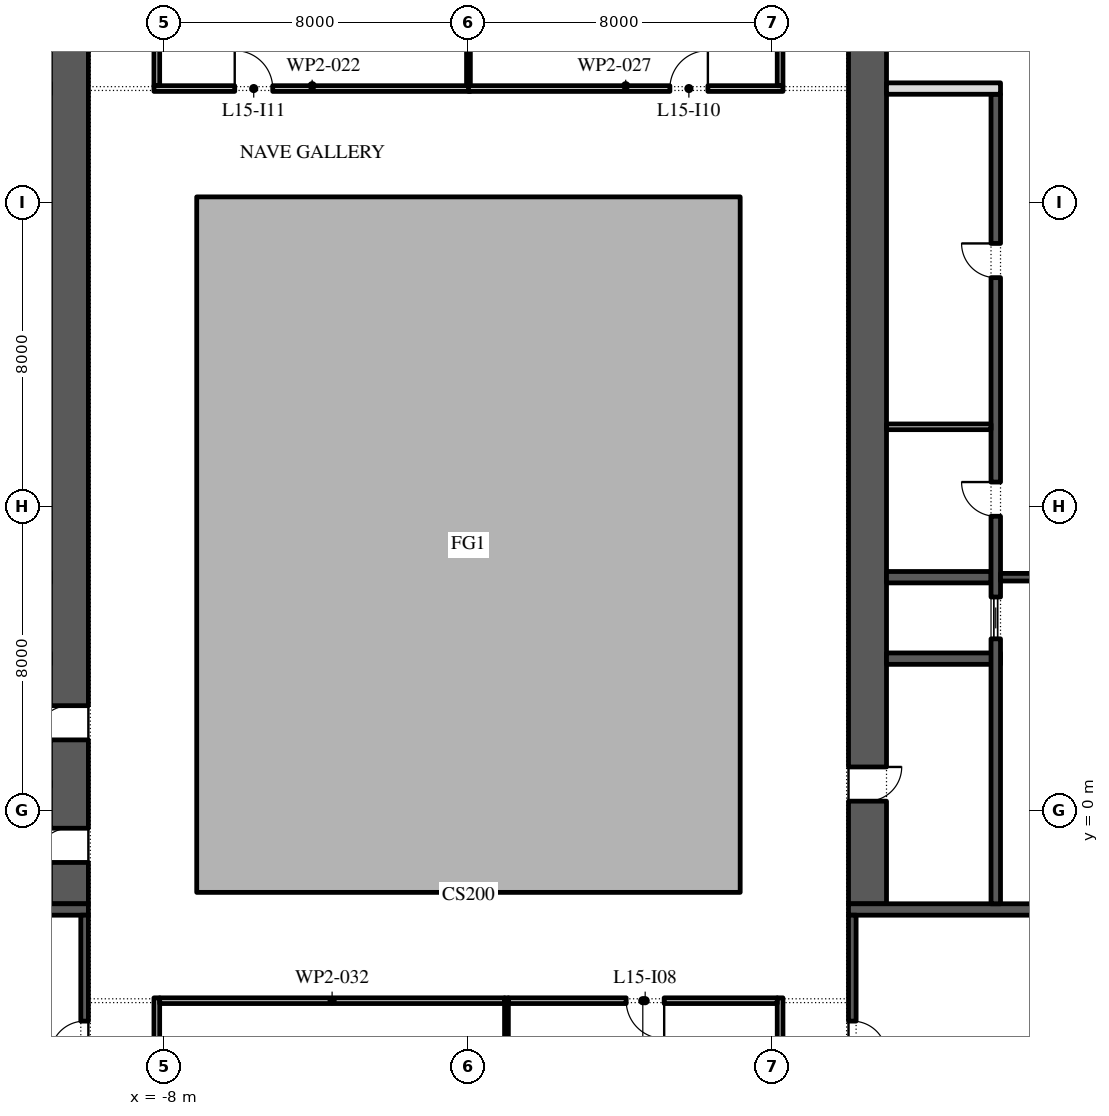
"""IFC4 building model, lengths in metres.
Left out: names, types, materials, properties, quantities, classifications, styles, units other than length and angle.
Written with IfcOpenShell. Run it as: python <this file> out.ifc"""

import sys

from ifc_helpers import new_model, si_unit, direction, frame, frame_2d, origin, place, context, subcontext, project, spatial, polyline, rectangle, outline, extrude, element, fill, save


model = new_model("IFC4")
c1 = context("Model", 3, precision=1e-05, world=origin(), true_north=direction((0.0, 1.0)))
c2 = subcontext(c1, "Body", "Model", "MODEL_VIEW")
j1 = project(units=[si_unit("LENGTHUNIT", "METRE"), si_unit("PLANEANGLEUNIT", "RADIAN")], contexts=[c1])
p1 = place(None, origin())
s1 = spatial("IfcSite", under=j1, at=p1, CompositionType="ELEMENT")
p2 = place(p1, origin())
s2 = spatial("IfcBuilding", under=s1, at=p2, CompositionType="ELEMENT")
p3 = place(p2, frame((0.0, 0.0, 73.2)))
s3 = spatial("IfcBuildingStorey", under=s2, at=p3, CompositionType="ELEMENT", Elevation=73.2)
p4 = place(p3, origin())
e1 = element("IfcWall", 1, at=p4, inside=s3, PredefinedType="STANDARD", context=c2, shape_type="SweptSolid", body=[
    extrude(outline(polyline([(-7.15, -2.15), (7.15, -2.15), (7.15, 16.15), (-7.15, 16.15), (-7.15, -2.15)]), holes=[polyline([(-7.0, -2.0), (-7.0, 16.0), (7.0, 16.0), (7.0, -2.0), (-7.0, -2.0)])]), origin(), (0.0, 0.0, 1.0), 4.0),
])
p5 = place(p3, frame((-10.5, -2.45, 0.0), z_axis=(0.0, 0.0, 1.0), x_axis=(0.0, 1.0, 0.0)))
e2 = element("IfcWall", 2, at=p5, inside=s3, PredefinedType="SHEAR", context=c2, shape_type="SweptSolid", body=[
    extrude(rectangle(XDim=27.9, YDim=1.0, at=frame_2d((13.95, 0.0))), origin(), (0.0, 0.0, 1.0), 4.0),
])
p6 = place(p5, frame((23.65, 0.0, 0.0)))
e3 = element("IfcOpeningElement", 3, at=p6, cuts=e2, PredefinedType="OPENING", context=c2, shape_type="SweptSolid", body=[
    extrude(rectangle(XDim=2.4, YDim=2.1, at=frame_2d((1.2, 1.05))), frame((0.0, 0.51, 0.0), z_axis=(0.0, -1.0, 0.0), x_axis=(1.0, 0.0, 0.0)), (0.0, 0.0, 1.0), 1.02),
])
p7 = place(p5, frame((1.087, 0.0, 0.0)))
e4 = element("IfcOpeningElement", 4, at=p7, cuts=e2, PredefinedType="OPENING", context=c2, shape_type="SweptSolid", body=[
    extrude(rectangle(XDim=0.9, YDim=2.1, at=frame_2d((0.45, 1.05))), frame((0.0, 0.51, 0.0), z_axis=(0.0, -1.0, 0.0), x_axis=(1.0, 0.0, 0.0)), (0.0, 0.0, 1.0), 1.02),
])
p8 = place(p5, frame((4.312, 0.0, 0.0)))
e5 = element("IfcOpeningElement", 5, at=p8, cuts=e2, PredefinedType="OPENING", context=c2, shape_type="SweptSolid", body=[
    extrude(rectangle(XDim=0.9, YDim=2.1, at=frame_2d((0.45, 1.05))), frame((0.0, 0.51, 0.0), z_axis=(0.0, -1.0, 0.0), x_axis=(1.0, 0.0, 0.0)), (0.0, 0.0, 1.0), 1.02),
])
p9 = place(p3, frame((-22.0, -2.6, 0.0), z_axis=(0.0, 0.0, 1.0), x_axis=(1.0, 0.0, 0.0)))
e6 = element("IfcWall", 6, at=p9, inside=s3, PredefinedType="SHEAR", context=c2, shape_type="SweptSolid", body=[
    extrude(rectangle(XDim=12.0, YDim=0.3, at=frame_2d((6.0, 0.0))), origin(), (0.0, 0.0, 1.0), 4.0),
])
p10 = place(p3, frame((-10.1, -15.8, 0.0), z_axis=(0.0, 0.0, 1.0), x_axis=(0.0, 1.0, 0.0)))
e7 = element("IfcWall", 7, at=p10, inside=s3, PredefinedType="SHEAR", context=c2, shape_type="SweptSolid", body=[
    extrude(rectangle(XDim=13.05, YDim=0.2, at=frame_2d((6.525, 0.0))), origin(), (0.0, 0.0, 1.0), 4.0),
])
p11 = place(p10, frame((2.762, 0.0, 0.0)))
e8 = element("IfcOpeningElement", 8, at=p11, cuts=e7, PredefinedType="OPENING", context=c2, shape_type="SweptSolid", body=[
    extrude(rectangle(XDim=0.9, YDim=2.1, at=frame_2d((0.45, 1.05))), frame((0.0, 0.11, 0.0), z_axis=(0.0, -1.0, 0.0), x_axis=(1.0, 0.0, 0.0)), (0.0, 0.0, 1.0), 0.22),
])
p12 = place(p10, frame((9.363, 0.0, 0.0)))
e9 = element("IfcOpeningElement", 9, at=p12, cuts=e7, PredefinedType="OPENING", context=c2, shape_type="SweptSolid", body=[
    extrude(rectangle(XDim=0.9, YDim=2.1, at=frame_2d((0.45, 1.05))), frame((0.0, 0.11, 0.0), z_axis=(0.0, -1.0, 0.0), x_axis=(1.0, 0.0, 0.0)), (0.0, 0.0, 1.0), 0.22),
])
p13 = place(p3, frame((10.5, -2.45, 0.0), z_axis=(0.0, 0.0, 1.0), x_axis=(0.0, 1.0, 0.0)))
e10 = element("IfcWall", 10, at=p13, inside=s3, PredefinedType="SHEAR", context=c2, shape_type="SweptSolid", body=[
    extrude(rectangle(XDim=27.9, YDim=1.0, at=frame_2d((13.95, 0.0))), origin(), (0.0, 0.0, 1.0), 4.0),
])
p14 = place(p13, frame((23.65, 0.0, 0.0)))
e11 = element("IfcOpeningElement", 11, at=p14, cuts=e10, PredefinedType="OPENING", context=c2, shape_type="SweptSolid", body=[
    extrude(rectangle(XDim=2.4, YDim=2.1, at=frame_2d((1.2, 1.05))), frame((0.0, 0.51, 0.0), z_axis=(0.0, -1.0, 0.0), x_axis=(1.0, 0.0, 0.0)), (0.0, 0.0, 1.0), 1.02),
])
p15 = place(p13, frame((2.7, 0.0, 0.0)))
e12 = element("IfcOpeningElement", 12, at=p15, cuts=e10, PredefinedType="OPENING", context=c2, shape_type="SweptSolid", body=[
    extrude(rectangle(XDim=0.9, YDim=2.1, at=frame_2d((0.45, 1.05))), frame((0.0, 0.51, 0.0), z_axis=(0.0, -1.0, 0.0), x_axis=(1.0, 0.0, 0.0)), (0.0, 0.0, 1.0), 1.02),
])
p16 = place(p3, frame((10.0, -2.6, 0.0), z_axis=(0.0, 0.0, 1.0), x_axis=(1.0, 0.0, 0.0)))
e13 = element("IfcWall", 13, at=p16, inside=s3, PredefinedType="SHEAR", context=c2, shape_type="SweptSolid", body=[
    extrude(rectangle(XDim=12.0, YDim=0.3, at=frame_2d((6.0, 0.0))), origin(), (0.0, 0.0, 1.0), 4.0),
])
p17 = place(p3, frame((11.0, 4.0, 0.0), z_axis=(0.0, 0.0, 1.0), x_axis=(1.0, 0.0, 0.0)))
e14 = element("IfcWall", 14, at=p17, inside=s3, PredefinedType="SHEAR", context=c2, shape_type="SweptSolid", body=[
    extrude(rectangle(XDim=3.0, YDim=0.3, at=frame_2d((1.5, 0.0))), origin(), (0.0, 0.0, 1.0), 4.0),
])
p18 = place(p3, frame((11.0, 6.143, 0.0), z_axis=(0.0, 0.0, 1.0), x_axis=(1.0, 0.0, 0.0)))
e15 = element("IfcWall", 15, at=p18, inside=s3, PredefinedType="SHEAR", context=c2, shape_type="SweptSolid", body=[
    extrude(rectangle(XDim=2.75, YDim=0.3, at=frame_2d((1.375, 0.0))), origin(), (0.0, 0.0, 1.0), 4.0),
])
p19 = place(p3, frame((13.875, -2.45, 0.0), z_axis=(0.0, 0.0, 1.0), x_axis=(0.0, 1.0, 0.0)))
e16 = element("IfcWall", 16, at=p19, inside=s3, PredefinedType="SHEAR", context=c2, shape_type="SweptSolid", body=[
    extrude(rectangle(XDim=21.3, YDim=0.25, at=frame_2d((10.65, 0.0))), origin(), (0.0, 0.0, 1.0), 4.0),
])
p20 = place(p19, frame((10.196, 0.0, 0.0)))
e17 = element("IfcOpeningElement", 17, at=p20, cuts=e16, PredefinedType="OPENING", context=c2, shape_type="SweptSolid", body=[
    extrude(rectangle(XDim=0.9, YDim=2.1, at=frame_2d((0.45, 1.05))), frame((0.0, 0.135, 0.0), z_axis=(0.0, -1.0, 0.0), x_axis=(1.0, 0.0, 0.0)), (0.0, 0.0, 1.0), 0.27),
])
p21 = place(p19, frame((16.475, 0.0, 0.0)))
e18 = element("IfcOpeningElement", 18, at=p21, cuts=e16, PredefinedType="OPENING", context=c2, shape_type="SweptSolid", body=[
    extrude(rectangle(XDim=0.9, YDim=2.1, at=frame_2d((0.45, 1.05))), frame((0.0, 0.135, 0.0), z_axis=(0.0, -1.0, 0.0), x_axis=(1.0, 0.0, 0.0)), (0.0, 0.0, 1.0), 0.27),
])
p22 = place(p19, frame((6.971, 0.0, 0.0)))
e19 = element("IfcOpeningElement", 19, at=p22, cuts=e16, PredefinedType="OPENING", context=c2, shape_type="SweptSolid", body=[
    extrude(rectangle(XDim=1.1, YDim=2.1, at=frame_2d((0.55, 1.05))), frame((0.0, 0.135, 0.0), z_axis=(0.0, -1.0, 0.0), x_axis=(1.0, 0.0, 0.0)), (0.0, 0.0, 1.0), 0.27),
])
p23 = place(p3, frame((11.0, 19.0, 0.0), z_axis=(0.0, 0.0, 1.0), x_axis=(1.0, 0.0, 0.0)))
e20 = element("IfcWall", 20, at=p23, inside=s3, PredefinedType="PARTITIONING", context=c2, shape_type="SweptSolid", body=[
    extrude(rectangle(XDim=3.0, YDim=0.3, at=frame_2d((1.5, 0.0))), origin(), (0.0, 0.0, 1.0), 4.0),
])
p24 = place(p3, frame((11.0, 10.1, 0.0), z_axis=(0.0, 0.0, 1.0), x_axis=(1.0, 0.0, 0.0)))
e21 = element("IfcWall", 21, at=p24, inside=s3, PredefinedType="PARTITIONING", context=c2, shape_type="SweptSolid", body=[
    extrude(rectangle(XDim=2.75, YDim=0.15, at=frame_2d((1.375, 0.0))), origin(), (0.0, 0.0, 1.0), 4.0),
])
p25 = place(p3, frame((14.0, 6.143, 0.0), z_axis=(0.0, 0.0, 1.0), x_axis=(1.0, 0.0, 0.0)))
e22 = element("IfcWall", 22, at=p25, inside=s3, PredefinedType="SHEAR", context=c2, shape_type="SweptSolid", body=[
    extrude(rectangle(XDim=4.0, YDim=0.2, at=frame_2d((2.0, 0.0))), origin(), (0.0, 0.0, 1.0), 4.0),
])
p26 = place(p25, frame((1.4, 0.0, 0.0)))
e23 = element("IfcOpeningElement", 23, at=p26, cuts=e22, PredefinedType="OPENING", context=c2, shape_type="SweptSolid", body=[
    extrude(rectangle(XDim=1.2, YDim=2.1, at=frame_2d((0.6, 1.05))), frame((0.0, 0.11, 0.0), z_axis=(0.0, -1.0, 0.0), x_axis=(1.0, 0.0, 0.0)), (0.0, 0.0, 1.0), 0.22),
])
p27 = place(p3, frame((10.1, -15.8, 0.0), z_axis=(0.0, 0.0, 1.0), x_axis=(0.0, 1.0, 0.0)))
e24 = element("IfcWall", 24, at=p27, inside=s3, PredefinedType="SHEAR", context=c2, shape_type="SweptSolid", body=[
    extrude(rectangle(XDim=13.05, YDim=0.2, at=frame_2d((6.525, 0.0))), origin(), (0.0, 0.0, 1.0), 4.0),
])
p28 = place(p27, frame((1.175, 0.0, 0.0)))
e25 = element("IfcOpeningElement", 25, at=p28, cuts=e24, PredefinedType="OPENING", context=c2, shape_type="SweptSolid", body=[
    extrude(rectangle(XDim=0.9, YDim=2.1, at=frame_2d((0.45, 1.05))), frame((0.0, 0.11, 0.0), z_axis=(0.0, -1.0, 0.0), x_axis=(1.0, 0.0, 0.0)), (0.0, 0.0, 1.0), 0.22),
])
p29 = place(p27, frame((4.413, 0.0, 0.0)))
e26 = element("IfcOpeningElement", 26, at=p29, cuts=e24, PredefinedType="OPENING", context=c2, shape_type="SweptSolid", body=[
    extrude(rectangle(XDim=1.0, YDim=2.1, at=frame_2d((0.5, 1.05))), frame((0.0, 0.11, 0.0), z_axis=(0.0, -1.0, 0.0), x_axis=(1.0, 0.0, 0.0)), (0.0, 0.0, 1.0), 0.22),
])
p30 = place(p27, frame((9.363, 0.0, 0.0)))
e27 = element("IfcOpeningElement", 27, at=p30, cuts=e24, PredefinedType="OPENING", context=c2, shape_type="SweptSolid", body=[
    extrude(rectangle(XDim=0.9, YDim=2.1, at=frame_2d((0.45, 1.05))), frame((0.0, 0.11, 0.0), z_axis=(0.0, -1.0, 0.0), x_axis=(1.0, 0.0, 0.0)), (0.0, 0.0, 1.0), 0.22),
])
p31 = place(p3, frame((-8.2, -4.925, 0.0), z_axis=(0.0, 0.0, 1.0), x_axis=(0.0, -1.0, 0.0)))
e28 = element("IfcWall", 28, at=p31, inside=s3, PredefinedType="PARTITIONING", context=c2, shape_type="SweptSolid", body=[
    extrude(rectangle(XDim=12.8, YDim=0.15, at=frame_2d((6.4, 0.0))), origin(), (0.0, 0.0, 1.0), 4.0),
])
p32 = place(p31, frame((7.225, 0.0, 0.0)))
e29 = element("IfcOpeningElement", 29, at=p32, cuts=e28, PredefinedType="OPENING", context=c2, shape_type="SweptSolid", body=[
    extrude(rectangle(XDim=1.0, YDim=2.1, at=frame_2d((0.5, 1.05))), frame((0.0, 0.085, 0.0), z_axis=(0.0, -1.0, 0.0), x_axis=(1.0, 0.0, 0.0)), (0.0, 0.0, 1.0), 0.17),
])
p33 = place(p3, frame((-8.275, 19.0, 0.0), z_axis=(0.0, 0.0, 1.0), x_axis=(1.0, 0.0, 0.0)))
e30 = element("IfcWall", 30, at=p33, inside=s3, PredefinedType="PARTITIONING", context=c2, shape_type="SweptSolid", body=[
    extrude(rectangle(XDim=8.325, YDim=0.15, at=frame_2d((4.163, 0.0))), origin(), (0.0, 0.0, 1.0), 4.0),
])
p34 = place(p33, frame((2.125, 0.0, 0.0)))
e31 = element("IfcOpeningElement", 31, at=p34, cuts=e30, PredefinedType="OPENING", context=c2, shape_type="SweptSolid", body=[
    extrude(rectangle(XDim=1.0, YDim=2.1, at=frame_2d((0.5, 1.05))), frame((0.0, 0.085, 0.0), z_axis=(0.0, -1.0, 0.0), x_axis=(1.0, 0.0, 0.0)), (0.0, 0.0, 1.0), 0.17),
])
p35 = place(p3, frame((-8.2, 27.2, 0.0), z_axis=(0.0, 0.0, 1.0), x_axis=(0.0, -1.0, 0.0)))
e32 = element("IfcWall", 32, at=p35, inside=s3, PredefinedType="PARTITIONING", context=c2, shape_type="SweptSolid", body=[
    extrude(rectangle(XDim=8.125, YDim=0.15, at=frame_2d((4.062, 0.0))), origin(), (0.0, 0.0, 1.0), 4.0),
])
p36 = place(p3, frame((0.0, 19.075, 0.0), z_axis=(0.0, 0.0, 1.0), x_axis=(0.0, 1.0, 0.0)))
e33 = element("IfcWall", 33, at=p36, inside=s3, PredefinedType="PARTITIONING", context=c2, shape_type="SweptSolid", body=[
    extrude(rectangle(XDim=9.725, YDim=0.1, at=frame_2d((4.863, 0.0))), origin(), (0.0, 0.0, 1.0), 4.0),
])
p37 = place(p3, frame((0.0, 19.0, 0.0), z_axis=(0.0, 0.0, 1.0), x_axis=(1.0, 0.0, 0.0)))
e34 = element("IfcWall", 34, at=p37, inside=s3, PredefinedType="PARTITIONING", context=c2, shape_type="SweptSolid", body=[
    extrude(rectangle(XDim=8.275, YDim=0.15, at=frame_2d((4.137, 0.0))), origin(), (0.0, 0.0, 1.0), 4.0),
])
p38 = place(p37, frame((5.3, 0.0, 0.0)))
e35 = element("IfcOpeningElement", 35, at=p38, cuts=e34, PredefinedType="OPENING", context=c2, shape_type="SweptSolid", body=[
    extrude(rectangle(XDim=1.0, YDim=2.1, at=frame_2d((0.5, 1.05))), frame((0.0, 0.085, 0.0), z_axis=(0.0, -1.0, 0.0), x_axis=(1.0, 0.0, 0.0)), (0.0, 0.0, 1.0), 0.17),
])
p39 = place(p3, frame((1.0, -11.45, 0.0), z_axis=(0.0, 0.0, 1.0), x_axis=(0.0, 1.0, 0.0)))
e36 = element("IfcWall", 36, at=p39, inside=s3, PredefinedType="PARTITIONING", context=c2, shape_type="SweptSolid", body=[
    extrude(rectangle(XDim=6.525, YDim=0.1, at=frame_2d((3.262, 0.0))), origin(), (0.0, 0.0, 1.0), 4.0),
])
p40 = place(p3, frame((0.95, -5.0, 0.0), z_axis=(0.0, 0.0, 1.0), x_axis=(-1.0, 0.0, 0.0)))
e37 = element("IfcWall", 37, at=p40, inside=s3, PredefinedType="PARTITIONING", context=c2, shape_type="SweptSolid", body=[
    extrude(rectangle(XDim=9.075, YDim=0.15, at=frame_2d((4.538, 0.0))), origin(), (0.0, 0.0, 1.0), 4.0),
])
p41 = place(p3, frame((8.2, -11.45, 0.0), z_axis=(0.0, 0.0, 1.0), x_axis=(0.0, 1.0, 0.0)))
e38 = element("IfcWall", 38, at=p41, inside=s3, PredefinedType="PARTITIONING", context=c2, shape_type="SweptSolid", body=[
    extrude(rectangle(XDim=6.525, YDim=0.15, at=frame_2d((3.262, 0.0))), origin(), (0.0, 0.0, 1.0), 4.0),
])
p42 = place(p3, frame((8.125, -5.0, 0.0), z_axis=(0.0, 0.0, 1.0), x_axis=(-1.0, 0.0, 0.0)))
e39 = element("IfcWall", 39, at=p42, inside=s3, PredefinedType="PARTITIONING", context=c2, shape_type="SweptSolid", body=[
    extrude(rectangle(XDim=7.075, YDim=0.15, at=frame_2d((3.538, 0.0))), origin(), (0.0, 0.0, 1.0), 4.0),
])
p43 = place(p42, frame((2.975, 0.0, 0.0)))
e40 = element("IfcOpeningElement", 40, at=p43, cuts=e39, PredefinedType="OPENING", context=c2, shape_type="SweptSolid", body=[
    extrude(rectangle(XDim=1.0, YDim=2.1, at=frame_2d((0.5, 1.05))), frame((0.0, 0.085, 0.0), z_axis=(0.0, -1.0, 0.0), x_axis=(1.0, 0.0, 0.0)), (0.0, 0.0, 1.0), 0.17),
])
p44 = place(p3, frame((8.2, 19.075, 0.0), z_axis=(0.0, 0.0, 1.0), x_axis=(0.0, 1.0, 0.0)))
e41 = element("IfcWall", 41, at=p44, inside=s3, PredefinedType="PARTITIONING", context=c2, shape_type="SweptSolid", body=[
    extrude(rectangle(XDim=8.125, YDim=0.15, at=frame_2d((4.062, 0.0))), origin(), (0.0, 0.0, 1.0), 4.0),
])
p45 = place(p12, origin())
e42 = element("IfcDoor", 42, at=p45, inside=s3, OperationType="SINGLE_SWING_RIGHT", PredefinedType="DOOR", context=c2, shape_type="SweptSolid", body=[
    extrude(rectangle(XDim=0.9, YDim=2.1, at=frame_2d((0.45, 1.05))), frame((0.0, 0.1, 0.0), z_axis=(0.0, -1.0, 0.0), x_axis=(1.0, 0.0, 0.0)), (0.0, 0.0, 1.0), 0.05),
])
fill(e9, e42)
p46 = place(p20, origin())
e43 = element("IfcDoor", 43, at=p46, inside=s3, OperationType="SINGLE_SWING_LEFT", PredefinedType="DOOR", context=c2, shape_type="SweptSolid", body=[
    extrude(rectangle(XDim=0.9, YDim=2.1, at=frame_2d((0.45, 1.05))), frame((0.0, 0.125, 0.0), z_axis=(0.0, -1.0, 0.0), x_axis=(1.0, 0.0, 0.0)), (0.0, 0.0, 1.0), 0.05),
])
fill(e17, e43)
p47 = place(p21, origin())
e44 = element("IfcDoor", 44, at=p47, inside=s3, OperationType="SINGLE_SWING_LEFT", PredefinedType="DOOR", context=c2, shape_type="SweptSolid", body=[
    extrude(rectangle(XDim=0.9, YDim=2.1, at=frame_2d((0.45, 1.05))), frame((0.0, 0.125, 0.0), z_axis=(0.0, -1.0, 0.0), x_axis=(1.0, 0.0, 0.0)), (0.0, 0.0, 1.0), 0.05),
])
fill(e18, e44)
p48 = place(p22, origin())
e45 = element("IfcDoor", 45, at=p48, inside=s3, OperationType="SLIDING_TO_LEFT", PredefinedType="DOOR", context=c2, shape_type="SweptSolid", body=[
    extrude(rectangle(XDim=1.1, YDim=2.1, at=frame_2d((0.55, 1.05))), frame((0.0, 0.025, 0.0), z_axis=(0.0, -1.0, 0.0), x_axis=(1.0, 0.0, 0.0)), (0.0, 0.0, 1.0), 0.05),
])
fill(e19, e45)
p49 = place(p15, frame((0.9, -0.95, 0.0), z_axis=(0.0, 0.0, 1.0), x_axis=(-1.0, 0.0, 0.0)))
e46 = element("IfcDoor", 46, at=p49, inside=s3, OperationType="SINGLE_SWING_RIGHT", PredefinedType="DOOR", context=c2, shape_type="SweptSolid", body=[
    extrude(rectangle(XDim=0.9, YDim=2.1, at=frame_2d((0.45, 1.05))), frame((0.0, -0.45, 0.0), z_axis=(0.0, -1.0, 0.0), x_axis=(1.0, 0.0, 0.0)), (0.0, 0.0, 1.0), 0.05),
])
fill(e12, e46)
p50 = place(p30, frame((0.9, -0.15, 0.0), z_axis=(0.0, 0.0, 1.0), x_axis=(-1.0, 0.0, 0.0)))
e47 = element("IfcDoor", 47, at=p50, inside=s3, OperationType="SINGLE_SWING_LEFT", PredefinedType="DOOR", context=c2, shape_type="SweptSolid", body=[
    extrude(rectangle(XDim=0.9, YDim=2.1, at=frame_2d((0.45, 1.05))), frame((0.0, -0.05, 0.0), z_axis=(0.0, -1.0, 0.0), x_axis=(1.0, 0.0, 0.0)), (0.0, 0.0, 1.0), 0.05),
])
fill(e27, e47)
p51 = place(p43, origin())
e48 = element("IfcDoor", 48, at=p51, inside=s3, OperationType="SINGLE_SWING_RIGHT", PredefinedType="DOOR", context=c2, shape_type="SweptSolid", body=[
    extrude(rectangle(XDim=1.0, YDim=2.1, at=frame_2d((0.5, 1.05))), frame((0.0, 0.025, 0.0), z_axis=(0.0, -1.0, 0.0), x_axis=(1.0, 0.0, 0.0)), (0.0, 0.0, 1.0), 0.05),
])
fill(e40, e48)
p52 = place(p38, origin())
e49 = element("IfcDoor", 49, at=p52, inside=s3, OperationType="SINGLE_SWING_LEFT", PredefinedType="DOOR", context=c2, shape_type="SweptSolid", body=[
    extrude(rectangle(XDim=1.0, YDim=2.1, at=frame_2d((0.5, 1.05))), frame((0.0, 0.025, 0.0), z_axis=(0.0, -1.0, 0.0), x_axis=(1.0, 0.0, 0.0)), (0.0, 0.0, 1.0), 0.05),
])
fill(e35, e49)
p53 = place(p34, origin())
e50 = element("IfcDoor", 50, at=p53, inside=s3, OperationType="SINGLE_SWING_RIGHT", PredefinedType="DOOR", context=c2, shape_type="SweptSolid", body=[
    extrude(rectangle(XDim=1.0, YDim=2.1, at=frame_2d((0.5, 1.05))), frame((0.0, 0.025, 0.0), z_axis=(0.0, -1.0, 0.0), x_axis=(1.0, 0.0, 0.0)), (0.0, 0.0, 1.0), 0.05),
])
fill(e31, e50)
save(model, sys.argv[1])
